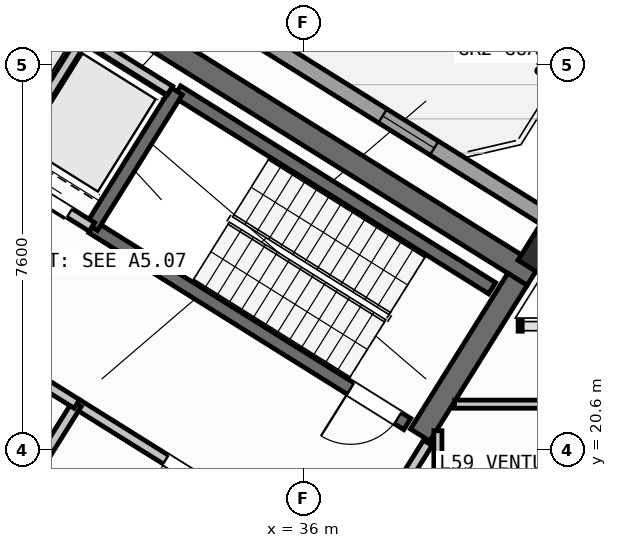
"""IFC4 building model, lengths in metres.
Left out: names, types, materials, properties, quantities, classifications, styles, units other than length and angle.
Written with IfcOpenShell. Run it as: python <this file> out.ifc"""

import sys

from ifc_helpers import new_model, si_unit, direction, frame, frame_2d, origin, origin_2d, place, context, subcontext, project, spatial, rectangle, hollow_rectangle, extrude, source, transform, mapped, element, fill, save


model = new_model("IFC4")
c1 = context("Model", 3, precision=1e-05, world=origin(), true_north=direction((0.0, 1.0)))
c2 = subcontext(c1, "Body", "Model", "MODEL_VIEW")
j1 = project(units=[si_unit("LENGTHUNIT", "METRE"), si_unit("PLANEANGLEUNIT", "RADIAN")], contexts=[c1])
p1 = place(None, origin())
s1 = spatial("IfcSite", under=j1, at=p1, CompositionType="ELEMENT")
p2 = place(p1, origin())
s2 = spatial("IfcBuilding", under=s1, at=p2, CompositionType="ELEMENT")
p3 = place(p2, frame((0.0, 0.0, 233.7)))
s3 = spatial("IfcBuildingStorey", under=s2, at=p3, CompositionType="ELEMENT", Elevation=233.7)
p4 = place(p3, frame((40.531, 24.036, 0.0), z_axis=(0.0, 0.0, 1.0), x_axis=(-0.848048787466, 0.529918157905, 0.0)))
e1 = element("IfcWall", 1, at=p4, inside=s3, PredefinedType="SHEAR", context=c2, shape_type="SweptSolid", body=[
    extrude(rectangle(XDim=13.04, YDim=0.45, at=frame_2d((6.52, 0.0))), origin(), (0.0, 0.0, 1.0), 4.55),
])
p5 = place(p3, frame((40.221, 23.965, 0.0), z_axis=(0.0, 0.0, 1.0), x_axis=(-0.529902075036, -0.848058836916, 0.0)))
e2 = element("IfcWall", 2, at=p5, inside=s3, PredefinedType="SHEAR", context=c2, shape_type="SweptSolid", body=[
    extrude(rectangle(XDim=3.625, YDim=0.45, at=frame_2d((1.812, 0.0))), origin(), (0.0, 0.0, 1.0), 4.55),
])
m1 = source(origin(), c2, "Body", "SweptSolid", [
    extrude(hollow_rectangle(XDim=0.8, YDim=0.8, WallThickness=0.032, at=origin_2d()), origin(), (0.0, 0.0, 1.0), 4.8),
])
p6 = place(p3, frame((40.783, 24.469, 0.0), z_axis=(0.0, 0.0, 1.0), x_axis=(-0.848048096156, 0.529919264233, 0.0)))
e3 = element("IfcColumn", 3, at=p6, inside=s3, PredefinedType="COLUMN", context=c2, shape_type="MappedRepresentation", body=[
    mapped(m1, transform((0.0, 0.0, 0.0), scale=1.0)),
])
p7 = place(p3, frame((14.138, 41.825, 0.0), z_axis=(0.0, 0.0, 1.0), x_axis=(0.848046498049, -0.529921821731, 0.0)))
e4 = element("IfcWall", 4, at=p7, inside=s3, PredefinedType="STANDARD", context=c2, shape_type="SweptSolid", body=[
    extrude(rectangle(XDim=31.588, YDim=0.32, at=frame_2d((15.794, 0.0))), origin(), (0.0, 0.0, 1.0), 4.55),
])
p8 = place(p7, frame((2.526, 0.0, 0.0)))
e5 = element("IfcOpeningElement", 5, at=p8, cuts=e4, PredefinedType="OPENING", context=c2, shape_type="SweptSolid", body=[
    extrude(rectangle(XDim=1.05, YDim=2.15, at=frame_2d((0.525, 1.075))), frame((0.0, 0.17, 0.0), z_axis=(0.0, -1.0, 0.0), x_axis=(1.0, 0.0, 0.0)), (0.0, 0.0, 1.0), 0.34),
])
p9 = place(p7, frame((14.274, 0.0, 0.0)))
e6 = element("IfcOpeningElement", 6, at=p9, cuts=e4, PredefinedType="OPENING", context=c2, shape_type="SweptSolid", body=[
    extrude(rectangle(XDim=1.5, YDim=2.25, at=frame_2d((0.75, 1.125))), frame((0.0, 0.17, 0.0), z_axis=(0.0, -1.0, 0.0), x_axis=(1.0, 0.0, 0.0)), (0.0, 0.0, 1.0), 0.34),
])
p10 = place(p7, frame((0.775, 0.0, 0.95)))
e7 = element("IfcOpeningElement", 7, at=p10, cuts=e4, PredefinedType="OPENING", context=c2, shape_type="SweptSolid", body=[
    extrude(rectangle(XDim=1.2, YDim=1.4, at=frame_2d((0.6, 0.7))), frame((0.0, 0.17, 0.0), z_axis=(0.0, -1.0, 0.0), x_axis=(1.0, 0.0, 0.0)), (0.0, 0.0, 1.0), 0.34),
])
p11 = place(p7, frame((9.552, 0.0, 0.85)))
e8 = element("IfcOpeningElement", 8, at=p11, cuts=e4, PredefinedType="OPENING", context=c2, shape_type="SweptSolid", body=[
    extrude(rectangle(XDim=1.8, YDim=1.5, at=frame_2d((0.9, 0.75))), frame((0.0, 0.17, 0.0), z_axis=(0.0, -1.0, 0.0), x_axis=(1.0, 0.0, 0.0)), (0.0, 0.0, 1.0), 0.34),
])
p12 = place(p7, frame((21.969, 0.0, 0.95)))
e9 = element("IfcOpeningElement", 9, at=p12, cuts=e4, PredefinedType="OPENING", context=c2, shape_type="SweptSolid", body=[
    extrude(rectangle(XDim=1.2, YDim=1.4, at=frame_2d((0.6, 0.7))), frame((0.0, 0.17, 0.0), z_axis=(0.0, -1.0, 0.0), x_axis=(1.0, 0.0, 0.0)), (0.0, 0.0, 1.0), 0.34),
])
p13 = place(p7, frame((27.619, 0.0, 0.95)))
e10 = element("IfcOpeningElement", 10, at=p13, cuts=e4, PredefinedType="OPENING", context=c2, shape_type="SweptSolid", body=[
    extrude(rectangle(XDim=1.2, YDim=1.4, at=frame_2d((0.6, 0.7))), frame((0.0, 0.17, 0.0), z_axis=(0.0, -1.0, 0.0), x_axis=(1.0, 0.0, 0.0)), (0.0, 0.0, 1.0), 0.34),
])
p14 = place(p3, frame((31.28, 18.261, 0.0), z_axis=(0.0, 0.0, 1.0), x_axis=(-0.848051618787, 0.529913626805, 0.0)))
e11 = element("IfcWall", 11, at=p14, inside=s3, PredefinedType="SHEAR", context=c2, shape_type="SweptSolid", body=[
    extrude(rectangle(XDim=7.46, YDim=0.26, at=frame_2d((3.73, 0.0))), origin(), (0.0, 0.0, 1.0), 4.55),
])
p15 = place(p14, frame((0.36, 0.0, 0.0)))
e12 = element("IfcOpeningElement", 12, at=p15, cuts=e11, PredefinedType="OPENING", context=c2, shape_type="SweptSolid", body=[
    extrude(rectangle(XDim=0.86, YDim=2.05, at=frame_2d((0.43, 1.025))), frame((0.0, 0.14, 0.0), z_axis=(0.0, -1.0, 0.0), x_axis=(1.0, 0.0, 0.0)), (0.0, 0.0, 1.0), 0.28),
])
p16 = place(p3, frame((39.721, 23.788, 0.0), z_axis=(0.0, 0.0, 1.0), x_axis=(-0.848054434086, 0.529909121291, 0.0)))
e13 = element("IfcWall", 13, at=p16, inside=s3, PredefinedType="SHEAR", context=c2, shape_type="SweptSolid", body=[
    extrude(rectangle(XDim=7.33, YDim=0.26, at=frame_2d((3.665, 0.0))), origin(), (0.0, 0.0, 1.0), 4.55),
])
p17 = place(p3, frame((38.046, 21.108, 0.0), z_axis=(0.0, 0.0, 1.0), x_axis=(-0.848054434086, 0.529909121291, 0.0)))
e14 = element("IfcWall", 14, at=p17, inside=s3, PredefinedType="SHEAR", context=c2, shape_type="SweptSolid", body=[
    extrude(rectangle(XDim=7.33, YDim=0.26, at=frame_2d((3.665, 0.0))), origin(), (0.0, 0.0, 1.0), 4.55),
])
p18 = place(p17, frame((0.22, 0.0, 0.0)))
e15 = element("IfcOpeningElement", 15, at=p18, cuts=e14, PredefinedType="OPENING", context=c2, shape_type="SweptSolid", body=[
    extrude(rectangle(XDim=1.1, YDim=2.1, at=frame_2d((0.55, 1.05))), frame((0.0, 0.14, 0.0), z_axis=(0.0, -1.0, 0.0), x_axis=(1.0, 0.0, 0.0)), (0.0, 0.0, 1.0), 0.28),
])
p19 = place(p3, frame((33.496, 27.677, 0.0), z_axis=(0.0, 0.0, 1.0), x_axis=(-0.529908658664, -0.84805472316, 0.0)))
e16 = element("IfcWall", 16, at=p19, inside=s3, PredefinedType="SHEAR", context=c2, shape_type="SweptSolid", body=[
    extrude(rectangle(XDim=3.16, YDim=0.26, at=frame_2d((1.58, 0.0))), origin(), (0.0, 0.0, 1.0), 4.55),
])
p20 = place(p3, frame((36.459, 18.421, 0.0), z_axis=(0.0, 0.0, 1.0), x_axis=(-0.848059591691, 0.529900867089, 0.0)))
e17 = element("IfcWall", 17, at=p20, inside=s3, PredefinedType="STANDARD", context=c2, shape_type="SweptSolid", body=[
    extrude(rectangle(XDim=5.818, YDim=0.2, at=frame_2d((2.909, 0.0))), origin(), (0.0, 0.0, 1.0), 4.54),
])
p21 = place(p20, frame((2.598, 0.0, 0.0)))
e18 = element("IfcOpeningElement", 18, at=p21, cuts=e17, PredefinedType="OPENING", context=c2, shape_type="SweptSolid", body=[
    extrude(rectangle(XDim=1.15, YDim=2.1, at=frame_2d((0.575, 1.05))), frame((0.0, 0.11, 0.0), z_axis=(0.0, -1.0, 0.0), x_axis=(1.0, 0.0, 0.0)), (0.0, 0.0, 1.0), 0.22),
])
p22 = place(p3, frame((31.822, 24.998, 0.0), z_axis=(0.0, 0.0, 1.0), x_axis=(-0.848054125777, 0.529909614701, 0.0)))
e19 = element("IfcWall", 19, at=p22, inside=s3, PredefinedType="STANDARD", context=c2, shape_type="SweptSolid", body=[
    extrude(rectangle(XDim=4.668, YDim=0.2, at=frame_2d((2.334, 0.0))), origin(), (0.0, 0.0, 1.0), 4.54),
])
p23 = place(p22, frame((0.52, 0.0, 0.0)))
e20 = element("IfcOpeningElement", 20, at=p23, cuts=e19, PredefinedType="OPENING", context=c2, shape_type="SweptSolid", body=[
    extrude(rectangle(XDim=1.2, YDim=2.15, at=frame_2d((0.6, 1.075))), frame((0.0, 0.11, 0.0), z_axis=(0.0, -1.0, 0.0), x_axis=(1.0, 0.0, 0.0)), (0.0, 0.0, 1.0), 0.22),
])
p24 = place(p22, frame((2.54, 0.0, 0.0)))
e21 = element("IfcOpeningElement", 21, at=p24, cuts=e19, PredefinedType="OPENING", context=c2, shape_type="SweptSolid", body=[
    extrude(rectangle(XDim=1.2, YDim=2.15, at=frame_2d((0.6, 1.075))), frame((0.0, 0.11, 0.0), z_axis=(0.0, -1.0, 0.0), x_axis=(1.0, 0.0, 0.0)), (0.0, 0.0, 1.0), 0.22),
])
p25 = place(p3, frame((31.645, 28.716, 0.0), z_axis=(0.0, 0.0, 1.0), x_axis=(-0.52986693015, -0.848080795876, 0.0)))
e22 = element("IfcWall", 22, at=p25, inside=s3, PredefinedType="STANDARD", context=c2, shape_type="SweptSolid", body=[
    extrude(rectangle(XDim=2.66, YDim=0.2, at=frame_2d((1.33, 0.0))), origin(), (0.0, 0.0, 1.0), 4.54),
])
p26 = place(p3, frame((33.363, 27.69, 0.0), z_axis=(0.0, 0.0, 1.0), x_axis=(-0.84804957148, 0.529916903215, 0.0)))
e23 = element("IfcWall", 23, at=p26, inside=s3, PredefinedType="STANDARD", context=c2, shape_type="SweptSolid", body=[
    extrude(rectangle(XDim=4.548, YDim=0.2, at=frame_2d((2.274, 0.0))), origin(), (0.0, 0.0, 1.0), 4.54),
])
p27 = place(p3, frame((31.525, 21.504, 0.0), z_axis=(0.0, 0.0, 1.0), x_axis=(-0.529907497854, -0.848055448493, 0.0)))
e24 = element("IfcWall", 24, at=p27, inside=s3, PredefinedType="STANDARD", context=c2, shape_type="SweptSolid", body=[
    extrude(rectangle(XDim=2.88, YDim=0.2, at=frame_2d((1.44, 0.0))), origin(), (0.0, 0.0, 1.0), 4.54),
])
p28 = place(p3, frame((31.525, 21.504, 0.0), z_axis=(0.0, 0.0, 1.0), x_axis=(-0.848042066329, 0.529928913853, 0.0)))
e25 = element("IfcWall", 25, at=p28, inside=s3, PredefinedType="STANDARD", context=c2, shape_type="SweptSolid", body=[
    extrude(rectangle(XDim=6.268, YDim=0.2, at=frame_2d((3.134, 0.0))), origin(), (0.0, 0.0, 1.0), 4.54),
])
p29 = place(p28, frame((4.4, 0.0, 0.0)))
e26 = element("IfcOpeningElement", 26, at=p29, cuts=e25, PredefinedType="OPENING", context=c2, shape_type="SweptSolid", body=[
    extrude(rectangle(XDim=0.86, YDim=2.05, at=frame_2d((0.43, 1.025))), frame((0.0, 0.11, 0.0), z_axis=(0.0, -1.0, 0.0), x_axis=(1.0, 0.0, 0.0)), (0.0, 0.0, 1.0), 0.22),
])
p30 = place(p28, frame((1.45, 0.0, 0.0)))
e27 = element("IfcOpeningElement", 27, at=p30, cuts=e25, PredefinedType="OPENING", context=c2, shape_type="SweptSolid", body=[
    extrude(rectangle(XDim=0.86, YDim=2.05, at=frame_2d((0.43, 1.025))), frame((0.0, 0.11, 0.0), z_axis=(0.0, -1.0, 0.0), x_axis=(1.0, 0.0, 0.0)), (0.0, 0.0, 1.0), 0.22),
])
p31 = place(p3, frame((38.451, 20.737, 0.0), z_axis=(0.0, 0.0, 1.0), x_axis=(-0.529924799939, -0.848044637038, 0.0)))
e28 = element("IfcWall", 28, at=p31, inside=s3, PredefinedType="STANDARD", context=c2, shape_type="SweptSolid", body=[
    extrude(rectangle(XDim=2.96, YDim=0.2, at=frame_2d((1.48, 0.0))), origin(), (0.0, 0.0, 1.0), 4.54),
])
p32 = place(p31, frame((1.46, 0.0, 0.0)))
e29 = element("IfcOpeningElement", 29, at=p32, cuts=e28, PredefinedType="OPENING", context=c2, shape_type="SweptSolid", body=[
    extrude(rectangle(XDim=0.86, YDim=2.05, at=frame_2d((0.43, 1.025))), frame((0.0, 0.11, 0.0), z_axis=(0.0, -1.0, 0.0), x_axis=(1.0, 0.0, 0.0)), (0.0, 0.0, 1.0), 0.22),
])
p33 = place(p3, frame((38.65, 17.93, 0.0), z_axis=(0.0, 0.0, 1.0), x_axis=(0.0, 1.0, 0.0)))
e30 = element("IfcWall", 30, at=p33, inside=s3, PredefinedType="PARTITIONING", context=c2, shape_type="SweptSolid", body=[
    extrude(rectangle(XDim=3.046, YDim=0.16, at=frame_2d((1.523, 0.0))), origin(), (0.0, 0.0, 1.0), 4.54),
])
p34 = place(p3, frame((38.978, 21.5, 0.0), z_axis=(0.0, 0.0, 1.0), x_axis=(1.0, 0.0, 0.0)))
e31 = element("IfcWall", 31, at=p34, inside=s3, PredefinedType="PARTITIONING", context=c2, shape_type="SweptSolid", body=[
    extrude(rectangle(XDim=7.336, YDim=0.16, at=frame_2d((3.668, 0.0))), origin(), (0.0, 0.0, 1.0), 4.54),
])
m2 = source(origin(), c2, "Body", "SweptSolid", [
    extrude(rectangle(XDim=1.2, YDim=1.4, at=frame_2d((0.6, 0.7))), frame((0.0, 0.03, 0.0), z_axis=(0.0, -1.0, 0.0), x_axis=(1.0, 0.0, 0.0)), (0.0, 0.0, 1.0), 0.06),
])
p35 = place(p13, origin())
e32 = element("IfcWindow", 32, at=p35, inside=s3, PartitioningType="SINGLE_PANEL", PredefinedType="WINDOW", context=c2, shape_type="MappedRepresentation", body=[
    mapped(m2, transform((0.0, 0.0, 0.0), scale=1.0)),
])
fill(e10, e32)
m3 = source(origin(), c2, "Body", "SweptSolid", [
    extrude(rectangle(XDim=1.1, YDim=2.1, at=frame_2d((0.55, 1.05))), frame((0.0, 0.025, 0.0), z_axis=(0.0, -1.0, 0.0), x_axis=(1.0, 0.0, 0.0)), (0.0, 0.0, 1.0), 0.05),
])
p36 = place(p18, origin())
e33 = element("IfcDoor", 33, at=p36, inside=s3, OperationType="SINGLE_SWING_RIGHT", PredefinedType="DOOR", context=c2, shape_type="MappedRepresentation", body=[
    mapped(m3, transform((0.0, 0.0, 0.0), scale=1.0)),
])
fill(e15, e33)
m4 = source(origin(), c2, "Body", "SweptSolid", [
    extrude(rectangle(XDim=1.15, YDim=2.1, at=frame_2d((0.575, 1.05))), frame((0.0, 0.025, 0.0), z_axis=(0.0, -1.0, 0.0), x_axis=(1.0, 0.0, 0.0)), (0.0, 0.0, 1.0), 0.05),
])
p37 = place(p21, origin())
e34 = element("IfcDoor", 34, at=p37, inside=s3, OperationType="SINGLE_SWING_LEFT", PredefinedType="DOOR", context=c2, shape_type="MappedRepresentation", body=[
    mapped(m4, transform((0.0, 0.0, 0.0), scale=1.0)),
])
fill(e18, e34)
m5 = source(origin(), c2, "Body", "SweptSolid", [
    extrude(rectangle(XDim=1.2, YDim=2.15, at=frame_2d((0.6, 1.075))), frame((0.0, 0.025, 0.0), z_axis=(0.0, -1.0, 0.0), x_axis=(1.0, 0.0, 0.0)), (0.0, 0.0, 1.0), 0.05),
])
p38 = place(p23, origin())
e35 = element("IfcDoor", 35, at=p38, inside=s3, OperationType="DOUBLE_DOOR_SLIDING", PredefinedType="DOOR", context=c2, shape_type="MappedRepresentation", body=[
    mapped(m5, transform((0.0, 0.0, 0.0), scale=1.0)),
])
fill(e20, e35)
save(model, sys.argv[1])
